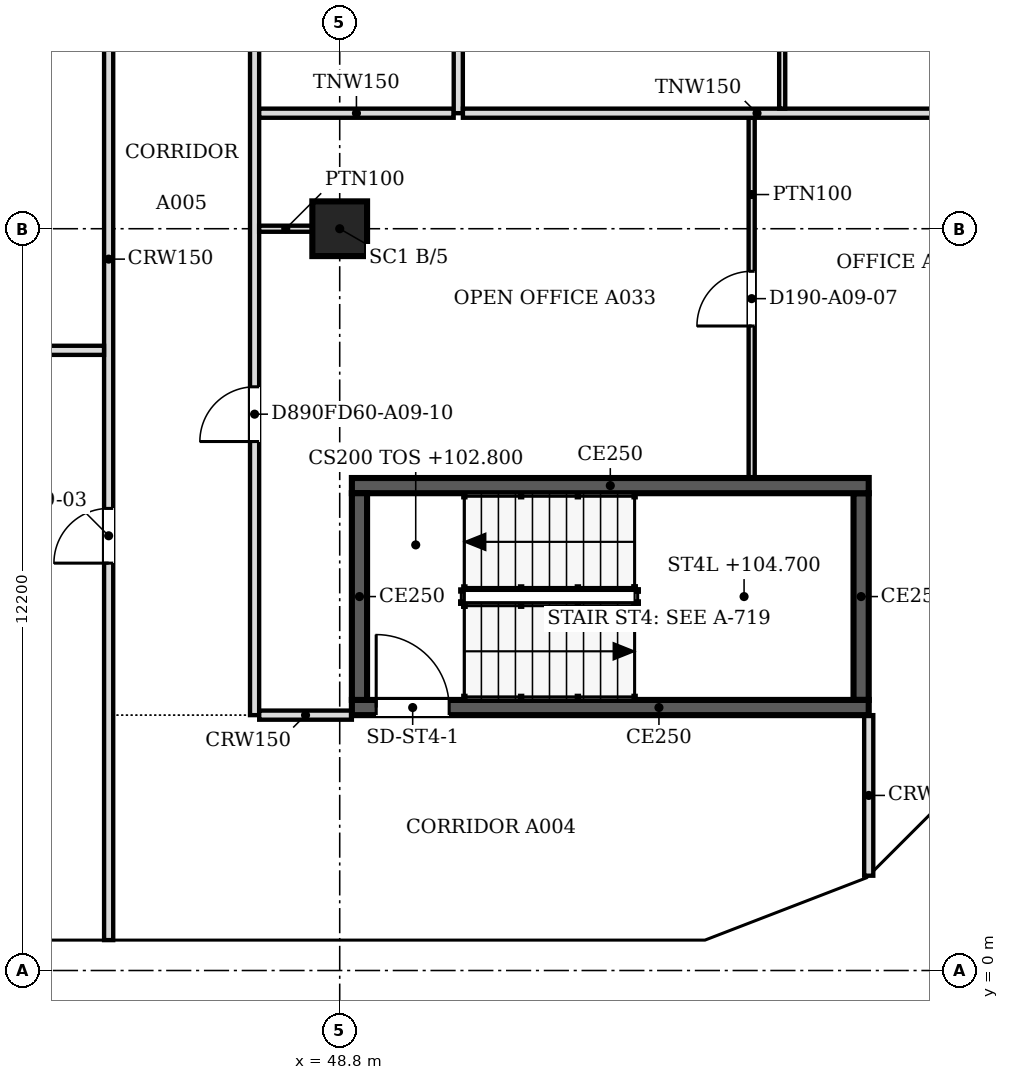
"""IFC4 building model, lengths in metres.
Left out: names, types, materials, properties, quantities, classifications, styles, units other than length and angle.
Written with IfcOpenShell. Run it as: python <this file> out.ifc"""

import sys

from ifc_helpers import new_model, si_unit, direction, frame, frame_2d, origin, origin_2d, place, context, subcontext, project, spatial, polyline, rectangle, outline, extrude, faceted_brep, source, transform, mapped, element, fill, save


model = new_model("IFC4")
c1 = context("Model", 3, precision=1e-05, world=origin(), true_north=direction((0.0, 1.0)))
c2 = subcontext(c1, "Body", "Model", "MODEL_VIEW")
j1 = project(units=[si_unit("LENGTHUNIT", "METRE"), si_unit("PLANEANGLEUNIT", "RADIAN")], contexts=[c1])
p1 = place(None, origin())
s1 = spatial("IfcSite", under=j1, at=p1, CompositionType="ELEMENT")
p2 = place(p1, origin())
s2 = spatial("IfcBuilding", under=s1, at=p2, CompositionType="ELEMENT")
p3 = place(p2, frame((0.0, 0.0, 102.8)))
s3 = spatial("IfcBuildingStorey", under=s2, at=p3, CompositionType="ELEMENT", Elevation=102.8)
p4 = place(p3, frame((48.8, 12.2, 0.0), z_axis=(0.0, 0.0, 1.0), x_axis=(1.0, 0.0, 0.0)))
e1 = element("IfcColumn", 1, at=p4, inside=s3, PredefinedType="COLUMN", context=c2, shape_type="SweptSolid", body=[
    extrude(rectangle(XDim=0.9, YDim=0.9, at=origin_2d()), origin(), (0.0, 0.0, 1.0), 3.55),
])
m1 = source(origin(), c2, "Body", "SweptSolid", [
    extrude(outline(polyline([(3.05, 0.0), (6.1, 3.8), (3.05, 7.6), (0.0, 3.8), (3.05, 0.0)])), frame((0.0, 0.25, 0.0), z_axis=(0.0, -1.0, 0.0), x_axis=(1.0, 0.0, 0.0)), (0.0, 0.0, 1.0), 0.5),
])
p5 = place(p3, frame((42.7, 0.25, -3.8), z_axis=(0.0, 0.0, 1.0), x_axis=(1.0, 0.0, 0.0)))
e2 = element("IfcWall", 2, at=p5, inside=s3, PredefinedType="SOLIDWALL", context=c2, shape_type="MappedRepresentation", body=[
    mapped(m1, transform((0.0, 0.0, 0.0), scale=1.0)),
])
m2 = source(origin(), c2, "Body", "SweptSolid", [
    extrude(outline(polyline([(3.05, 0.399), (5.78, 3.8), (3.05, 7.201), (0.321, 3.8), (3.05, 0.399)])), frame((0.0, 0.26, 0.0), z_axis=(0.0, -1.0, 0.0), x_axis=(1.0, 0.0, 0.0)), (0.0, 0.0, 1.0), 0.52),
])
p6 = place(p5, origin())
e3 = element("IfcOpeningElement", 3, at=p6, cuts=e2, PredefinedType="OPENING", context=c2, shape_type="MappedRepresentation", body=[
    mapped(m2, transform((0.0, 0.0, 0.0), scale=1.0)),
])
m3 = source(origin(), c2, "Body", "Brep", [
    faceted_brep([(3.05, -0.25, 0.0), (6.053, -0.25, 3.8), (3.05, -0.25, 7.6), (0.0, -0.25, 3.8), (0.0, 0.25, 3.8), (3.05, 0.25, 7.6), (6.007, 0.25, 3.859), (6.007, 0.25, 3.741), (3.05, 0.25, 0.0), (6.053, 0.0, 3.8)], [[[0, 1, 2, 3]], [[4, 5, 6, 7, 8]], [[8, 7, 9, 1, 0]], [[6, 5, 2, 1, 9]], [[5, 4, 3, 2]], [[4, 8, 0, 3]], [[9, 7, 6]]]),
])
p7 = place(p3, frame((48.8, 0.25, -3.8), z_axis=(0.0, 0.0, 1.0), x_axis=(1.0, 0.0, 0.0)))
e4 = element("IfcWall", 4, at=p7, inside=s3, PredefinedType="SOLIDWALL", context=c2, shape_type="MappedRepresentation", body=[
    mapped(m3, transform((0.0, 0.0, 0.0), scale=1.0)),
])
m4 = source(origin(), c2, "Body", "SweptSolid", [
    extrude(outline(polyline([(3.049, 0.401), (5.735, 3.8), (3.049, 7.199), (0.321, 3.8), (3.049, 0.401)])), frame((0.0, 0.26, 0.0), z_axis=(0.0, -1.0, 0.0), x_axis=(1.0, 0.0, 0.0)), (0.0, 0.0, 1.0), 0.52),
])
p8 = place(p7, origin())
e5 = element("IfcOpeningElement", 5, at=p8, cuts=e4, PredefinedType="OPENING", context=c2, shape_type="MappedRepresentation", body=[
    mapped(m4, transform((0.0, 0.0, 0.0), scale=1.0)),
])
m5 = source(origin(), c2, "Body", "Brep", [
    faceted_brep([(2.95, -0.25, 0.0), (3.003, -0.25, 0.068), (3.003, -0.25, 7.532), (2.95, -0.25, 7.6), (0.0, -0.25, 3.8), (0.047, 0.25, 3.86), (2.898, 0.25, 7.532), (2.898, 0.25, 0.068), (0.047, 0.25, 3.74), (2.95, 0.0, 0.0), (2.95, 0.0, 7.6), (0.0, 0.0, 3.8)], [[[0, 1, 2, 3, 4]], [[5, 6, 7, 8]], [[1, 0, 9]], [[10, 3, 2]], [[6, 5, 11, 4, 3, 10]], [[8, 7, 9, 0, 4, 11]], [[8, 11, 5]], [[1, 9, 7, 6, 10, 2]]]),
])
p9 = place(p3, frame((54.854, 0.25, -3.8), z_axis=(0.0, 0.0, 1.0), x_axis=(0.932970071518, 0.359953949349, 0.0)))
e6 = element("IfcWall", 6, at=p9, inside=s3, PredefinedType="SOLIDWALL", context=c2, shape_type="MappedRepresentation", body=[
    mapped(m5, transform((0.0, 0.0, 0.0), scale=1.0)),
])
m6 = source(origin(), c2, "Body", "SweptSolid", [
    extrude(outline(polyline([(2.75, 6.935), (0.316, 3.8), (2.75, 0.665), (2.75, 6.935)])), frame((0.0, 0.26, 0.0), z_axis=(0.0, -1.0, 0.0), x_axis=(1.0, 0.0, 0.0)), (0.0, 0.0, 1.0), 0.52),
])
p10 = place(p9, origin())
e7 = element("IfcOpeningElement", 7, at=p10, cuts=e6, PredefinedType="OPENING", context=c2, shape_type="MappedRepresentation", body=[
    mapped(m6, transform((0.0, 0.0, 0.0), scale=1.0)),
])
m7 = source(origin(), c2, "Body", "Brep", [
    faceted_brep([(0.053, -0.25, 0.0), (2.997, -0.25, 3.8), (0.053, -0.25, 7.6), (0.0, -0.25, 7.532), (0.0, -0.25, 0.068), (0.106, 0.25, 7.532), (2.944, 0.25, 3.868), (2.944, 0.25, 3.732), (0.106, 0.25, 0.068), (2.997, 0.0, 3.8), (0.053, 0.0, 0.0), (0.053, 0.0, 7.6)], [[[0, 1, 2, 3, 4]], [[5, 6, 7, 8]], [[8, 7, 9, 1, 0, 10]], [[6, 5, 11, 2, 1, 9]], [[3, 2, 11]], [[10, 0, 4]], [[8, 10, 4, 3, 11, 5]], [[9, 7, 6]]]),
])
p11 = place(p3, frame((57.569, 1.274, -3.8), z_axis=(0.0, 0.0, 1.0), x_axis=(0.707066050402, 0.707147509625, 0.0)))
e8 = element("IfcWall", 8, at=p11, inside=s3, PredefinedType="SOLIDWALL", context=c2, shape_type="MappedRepresentation", body=[
    mapped(m7, transform((0.0, 0.0, 0.0), scale=1.0)),
])
m8 = source(origin(), c2, "Body", "SweptSolid", [
    extrude(outline(polyline([(0.253, 0.666), (2.681, 3.8), (0.253, 6.934), (0.253, 0.666)])), frame((0.0, 0.26, 0.0), z_axis=(0.0, -1.0, 0.0), x_axis=(1.0, 0.0, 0.0)), (0.0, 0.0, 1.0), 0.52),
])
p12 = place(p11, origin())
e9 = element("IfcOpeningElement", 9, at=p12, cuts=e8, PredefinedType="OPENING", context=c2, shape_type="MappedRepresentation", body=[
    mapped(m8, transform((0.0, 0.0, 0.0), scale=1.0)),
])
m9 = source(origin(), c2, "Body", "SweptSolid", [
    extrude(outline(polyline([(3.05, 0.0), (6.1, 3.8), (0.0, 3.8), (3.05, 0.0)])), frame((0.0, 0.25, 0.0), z_axis=(0.0, -1.0, 0.0), x_axis=(1.0, 0.0, 0.0)), (0.0, 0.0, 1.0), 0.5),
])
p13 = place(p3, frame((39.65, 0.25, 0.0), z_axis=(0.0, 0.0, 1.0), x_axis=(1.0, 0.0, 0.0)))
e10 = element("IfcWall", 10, at=p13, inside=s3, PredefinedType="SOLIDWALL", context=c2, shape_type="MappedRepresentation", body=[
    mapped(m9, transform((0.0, 0.0, 0.0), scale=1.0)),
])
m10 = source(origin(), c2, "Body", "SweptSolid", [
    extrude(outline(polyline([(3.05, 0.399), (5.579, 3.55), (0.521, 3.55), (3.05, 0.399)])), frame((0.0, 0.26, 0.0), z_axis=(0.0, -1.0, 0.0), x_axis=(1.0, 0.0, 0.0)), (0.0, 0.0, 1.0), 0.52),
])
p14 = place(p13, origin())
e11 = element("IfcOpeningElement", 11, at=p14, cuts=e10, PredefinedType="OPENING", context=c2, shape_type="MappedRepresentation", body=[
    mapped(m10, transform((0.0, 0.0, 0.0), scale=1.0)),
])
p15 = place(p3, frame((45.75, 0.25, 0.0), z_axis=(0.0, 0.0, 1.0), x_axis=(1.0, 0.0, 0.0)))
e12 = element("IfcWall", 12, at=p15, inside=s3, PredefinedType="SOLIDWALL", context=c2, shape_type="MappedRepresentation", body=[
    mapped(m9, transform((0.0, 0.0, 0.0), scale=1.0)),
])
p16 = place(p15, origin())
e13 = element("IfcOpeningElement", 13, at=p16, cuts=e12, PredefinedType="OPENING", context=c2, shape_type="MappedRepresentation", body=[
    mapped(m10, transform((0.0, 0.0, 0.0), scale=1.0)),
])
m11 = source(origin(), c2, "Body", "Brep", [
    faceted_brep([(3.003, -0.25, 0.0), (3.05, -0.25, 0.06), (3.05, -0.25, 3.8), (0.0, -0.25, 3.8), (0.0, 0.25, 3.8), (2.957, 0.25, 3.8), (2.957, 0.25, 0.059), (3.003, 0.0, 0.0)], [[[0, 1, 2, 3]], [[4, 5, 6]], [[1, 0, 7]], [[5, 4, 3, 2]], [[4, 6, 7, 0, 3]], [[1, 7, 6, 5, 2]]]),
])
p17 = place(p3, frame((51.85, 0.25, 0.0), z_axis=(0.0, 0.0, 1.0), x_axis=(1.0, 0.0, 0.0)))
e14 = element("IfcWall", 14, at=p17, inside=s3, PredefinedType="SOLIDWALL", context=c2, shape_type="MappedRepresentation", body=[
    mapped(m11, transform((0.0, 0.0, 0.0), scale=1.0)),
])
m12 = source(origin(), c2, "Body", "SweptSolid", [
    extrude(outline(polyline([(2.803, 3.55), (0.516, 3.55), (2.803, 0.656), (2.803, 3.55)])), frame((0.0, 0.26, 0.0), z_axis=(0.0, -1.0, 0.0), x_axis=(1.0, 0.0, 0.0)), (0.0, 0.0, 1.0), 0.52),
])
p18 = place(p17, origin())
e15 = element("IfcOpeningElement", 15, at=p18, cuts=e14, PredefinedType="OPENING", context=c2, shape_type="MappedRepresentation", body=[
    mapped(m12, transform((0.0, 0.0, 0.0), scale=1.0)),
])
m13 = source(origin(), c2, "Body", "Brep", [
    faceted_brep([(0.047, -0.25, 0.0), (2.997, -0.25, 3.8), (0.0, -0.25, 3.8), (0.0, -0.25, 0.059), (0.093, 0.25, 3.8), (2.944, 0.25, 3.8), (2.944, 0.25, 3.732), (0.093, 0.25, 0.06), (2.997, 0.0, 3.8), (0.047, 0.0, 0.0)], [[[0, 1, 2, 3]], [[4, 5, 6, 7]], [[7, 6, 8, 1, 0, 9]], [[5, 4, 2, 1, 8]], [[9, 0, 3]], [[7, 9, 3, 2, 4]], [[6, 5, 8]]]),
])
p19 = place(p3, frame((54.81, 0.233, 0.0), z_axis=(0.0, 0.0, 1.0), x_axis=(0.932990326376, 0.359901446078, 0.0)))
e16 = element("IfcWall", 16, at=p19, inside=s3, PredefinedType="SOLIDWALL", context=c2, shape_type="MappedRepresentation", body=[
    mapped(m13, transform((0.0, 0.0, 0.0), scale=1.0)),
])
m14 = source(origin(), c2, "Body", "SweptSolid", [
    extrude(outline(polyline([(0.247, 0.665), (2.487, 3.55), (0.247, 3.55), (0.247, 0.665)])), frame((0.0, 0.26, 0.0), z_axis=(0.0, -1.0, 0.0), x_axis=(1.0, 0.0, 0.0)), (0.0, 0.0, 1.0), 0.52),
])
p20 = place(p19, origin())
e17 = element("IfcOpeningElement", 17, at=p20, cuts=e16, PredefinedType="OPENING", context=c2, shape_type="MappedRepresentation", body=[
    mapped(m14, transform((0.0, 0.0, 0.0), scale=1.0)),
])
m15 = source(origin(), c2, "Body", "Brep", [
    faceted_brep([(2.944, -0.25, 0.0), (2.997, -0.25, 0.068), (2.997, -0.25, 3.8), (0.0, -0.25, 3.8), (0.053, 0.25, 3.8), (2.891, 0.25, 3.8), (2.891, 0.25, 0.068), (0.053, 0.25, 3.732), (2.944, 0.0, 0.0), (0.0, 0.0, 3.8)], [[[0, 1, 2, 3]], [[4, 5, 6, 7]], [[1, 0, 8]], [[5, 4, 9, 3, 2]], [[7, 6, 8, 0, 3, 9]], [[7, 9, 4]], [[1, 8, 6, 5, 2]]]),
])
p21 = place(p3, frame((57.606, 1.312, 0.0), z_axis=(0.0, 0.0, 1.0), x_axis=(0.707147509625, 0.707066050402, 0.0)))
e18 = element("IfcWall", 18, at=p21, inside=s3, PredefinedType="SOLIDWALL", context=c2, shape_type="MappedRepresentation", body=[
    mapped(m15, transform((0.0, 0.0, 0.0), scale=1.0)),
])
m16 = source(origin(), c2, "Body", "SweptSolid", [
    extrude(outline(polyline([(2.744, 3.55), (0.51, 3.55), (2.744, 0.666), (2.744, 3.55)])), frame((0.0, 0.26, 0.0), z_axis=(0.0, -1.0, 0.0), x_axis=(1.0, 0.0, 0.0)), (0.0, 0.0, 1.0), 0.52),
])
p22 = place(p21, origin())
e19 = element("IfcOpeningElement", 19, at=p22, cuts=e18, PredefinedType="OPENING", context=c2, shape_type="MappedRepresentation", body=[
    mapped(m16, transform((0.0, 0.0, 0.0), scale=1.0)),
])
p23 = place(p3, frame((57.5, 4.325, 0.0), z_axis=(0.0, 0.0, 1.0), x_axis=(-1.0, 0.0, 0.0)))
e20 = element("IfcWall", 20, at=p23, inside=s3, PredefinedType="SOLIDWALL", context=c2, shape_type="SweptSolid", body=[
    extrude(rectangle(XDim=8.5, YDim=0.25, at=frame_2d((4.25, 0.0))), origin(), (0.0, 0.0, 1.0), 3.8),
])
m17 = source(origin(), c2, "Body", "SweptSolid", [
    extrude(rectangle(XDim=1.2, YDim=2.1, at=frame_2d((0.6, 1.05))), frame((0.0, 0.135, 0.0), z_axis=(0.0, -1.0, 0.0), x_axis=(1.0, 0.0, 0.0)), (0.0, 0.0, 1.0), 0.27),
])
p24 = place(p23, frame((6.9, 0.0, 0.0)))
e21 = element("IfcOpeningElement", 21, at=p24, cuts=e20, PredefinedType="OPENING", context=c2, shape_type="MappedRepresentation", body=[
    mapped(m17, transform((0.0, 0.0, 0.0), scale=1.0)),
])
p25 = place(p3, frame((49.125, 4.45, 0.0), z_axis=(0.0, 0.0, 1.0), x_axis=(0.0, 1.0, 0.0)))
e22 = element("IfcWall", 22, at=p25, inside=s3, PredefinedType="SOLIDWALL", context=c2, shape_type="SweptSolid", body=[
    extrude(rectangle(XDim=3.4, YDim=0.25, at=frame_2d((1.7, 0.0))), origin(), (0.0, 0.0, 1.0), 3.8),
])
p26 = place(p3, frame((49.0, 7.975, 0.0), z_axis=(0.0, 0.0, 1.0), x_axis=(1.0, 0.0, 0.0)))
e23 = element("IfcWall", 23, at=p26, inside=s3, PredefinedType="SOLIDWALL", context=c2, shape_type="SweptSolid", body=[
    extrude(rectangle(XDim=8.5, YDim=0.25, at=frame_2d((4.25, 0.0))), origin(), (0.0, 0.0, 1.0), 3.8),
])
p27 = place(p3, frame((57.375, 7.85, 0.0), z_axis=(0.0, 0.0, 1.0), x_axis=(0.0, -1.0, 0.0)))
e24 = element("IfcWall", 24, at=p27, inside=s3, PredefinedType="SOLIDWALL", context=c2, shape_type="SweptSolid", body=[
    extrude(rectangle(XDim=3.4, YDim=0.25, at=frame_2d((1.7, 0.0))), origin(), (0.0, 0.0, 1.0), 3.8),
])
p28 = place(p3, frame((45.0, 0.5, 0.0), z_axis=(0.0, 0.0, 1.0), x_axis=(0.0, 1.0, 0.0)))
e25 = element("IfcWall", 25, at=p28, inside=s3, PredefinedType="PARTITIONING", context=c2, shape_type="SweptSolid", body=[
    extrude(rectangle(XDim=21.724, YDim=0.15, at=frame_2d((10.862, 0.0))), origin(), (0.0, 0.0, 1.0), 2.715),
])
m18 = source(origin(), c2, "Body", "SweptSolid", [
    extrude(rectangle(XDim=0.9, YDim=2.1, at=frame_2d((0.45, 1.05))), frame((0.0, 0.085, 0.0), z_axis=(0.0, -1.0, 0.0), x_axis=(1.0, 0.0, 0.0)), (0.0, 0.0, 1.0), 0.17),
])
p29 = place(p28, frame((6.2, 0.0, 0.0)))
e26 = element("IfcOpeningElement", 26, at=p29, cuts=e25, PredefinedType="OPENING", context=c2, shape_type="MappedRepresentation", body=[
    mapped(m18, transform((0.0, 0.0, 0.0), scale=1.0)),
])
p30 = place(p28, frame((15.3, 0.0, 0.0)))
e27 = element("IfcOpeningElement", 27, at=p30, cuts=e25, PredefinedType="OPENING", context=c2, shape_type="MappedRepresentation", body=[
    mapped(m18, transform((0.0, 0.0, 0.0), scale=1.0)),
])
p31 = place(p3, frame((57.5, 1.559, 0.0), z_axis=(0.0, 0.0, 1.0), x_axis=(0.0, 1.0, 0.0)))
e28 = element("IfcWall", 28, at=p31, inside=s3, PredefinedType="PARTITIONING", context=c2, shape_type="SweptSolid", body=[
    extrude(rectangle(XDim=2.641, YDim=0.15, at=frame_2d((1.32, 0.0))), origin(), (0.0, 0.0, 1.0), 2.715),
])
p32 = place(p3, frame((47.4, 22.3, 0.0), z_axis=(0.0, 0.0, 1.0), x_axis=(0.0, -1.0, 0.0)))
e29 = element("IfcWall", 29, at=p32, inside=s3, PredefinedType="PARTITIONING", context=c2, shape_type="SweptSolid", body=[
    extrude(rectangle(XDim=18.1, YDim=0.15, at=frame_2d((9.05, 0.0))), origin(), (0.0, 0.0, 1.0), 2.715),
])
m19 = source(origin(), c2, "Body", "SweptSolid", [
    extrude(rectangle(XDim=1.0, YDim=2.1, at=frame_2d((0.5, 1.05))), frame((0.0, 0.085, 0.0), z_axis=(0.0, -1.0, 0.0), x_axis=(1.0, 0.0, 0.0)), (0.0, 0.0, 1.0), 0.17),
])
p33 = place(p32, frame((3.599, 0.0, 0.0)))
e30 = element("IfcOpeningElement", 30, at=p33, cuts=e29, PredefinedType="OPENING", context=c2, shape_type="MappedRepresentation", body=[
    mapped(m19, transform((0.0, 0.0, 0.0), scale=1.0)),
])
p34 = place(p32, frame((12.7, 0.0, 0.0)))
e31 = element("IfcOpeningElement", 31, at=p34, cuts=e29, PredefinedType="OPENING", context=c2, shape_type="MappedRepresentation", body=[
    mapped(m18, transform((0.0, 0.0, 0.0), scale=1.0)),
])
p35 = place(p3, frame((47.476, 4.2, 0.0), z_axis=(0.0, 0.0, 1.0), x_axis=(1.0, 0.0, 0.0)))
e32 = element("IfcWall", 32, at=p35, inside=s3, PredefinedType="PARTITIONING", context=c2, shape_type="SweptSolid", body=[
    extrude(rectangle(XDim=1.524, YDim=0.15, at=frame_2d((0.762, 0.0))), origin(), (0.0, 0.0, 1.0), 2.715),
])
p36 = place(p3, frame((55.575, 14.024, 0.0), z_axis=(0.0, 0.0, 1.0), x_axis=(0.0, -1.0, 0.0)))
e33 = element("IfcWall", 33, at=p36, inside=s3, PredefinedType="PARTITIONING", context=c2, shape_type="SweptSolid", body=[
    extrude(rectangle(XDim=5.924, YDim=0.1, at=frame_2d((2.962, 0.0))), origin(), (0.0, 0.0, 1.0), 2.715),
])
m20 = source(origin(), c2, "Body", "SweptSolid", [
    extrude(rectangle(XDim=0.9, YDim=2.1, at=frame_2d((0.45, 1.05))), frame((0.0, 0.06, 0.0), z_axis=(0.0, -1.0, 0.0), x_axis=(1.0, 0.0, 0.0)), (0.0, 0.0, 1.0), 0.12),
])
p37 = place(p36, frame((2.524, 0.0, 0.0)))
e34 = element("IfcOpeningElement", 34, at=p37, cuts=e33, PredefinedType="OPENING", context=c2, shape_type="MappedRepresentation", body=[
    mapped(m20, transform((0.0, 0.0, 0.0), scale=1.0)),
])
p38 = place(p3, frame((27.575, 10.2, 0.0), z_axis=(0.0, 0.0, 1.0), x_axis=(1.0, 0.0, 0.0)))
e35 = element("IfcWall", 35, at=p38, inside=s3, PredefinedType="PARTITIONING", context=c2, shape_type="SweptSolid", body=[
    extrude(rectangle(XDim=17.349, YDim=0.15, at=frame_2d((8.675, 0.0))), origin(), (0.0, 0.0, 1.0), 2.715),
])
p39 = place(p3, frame((48.35, 12.2, 0.0), z_axis=(0.0, 0.0, 1.0), x_axis=(-1.0, 0.0, 0.0)))
e36 = element("IfcWall", 36, at=p39, inside=s3, PredefinedType="PARTITIONING", context=c2, shape_type="SweptSolid", body=[
    extrude(rectangle(XDim=0.875, YDim=0.1, at=frame_2d((0.438, 0.0))), origin(), (0.0, 0.0, 1.0), 2.715),
])
p40 = place(p3, frame((47.476, 14.1, 0.0), z_axis=(0.0, 0.0, 1.0), x_axis=(1.0, 0.0, 0.0)))
e37 = element("IfcWall", 37, at=p40, inside=s3, PredefinedType="PARTITIONING", context=c2, shape_type="SweptSolid", body=[
    extrude(rectangle(XDim=3.198, YDim=0.15, at=frame_2d((1.599, 0.0))), origin(), (0.0, 0.0, 1.0), 2.715),
])
p41 = place(p3, frame((50.75, 22.224, 0.0), z_axis=(0.0, 0.0, 1.0), x_axis=(0.0, -1.0, 0.0)))
e38 = element("IfcWall", 38, at=p41, inside=s3, PredefinedType="PARTITIONING", context=c2, shape_type="SweptSolid", body=[
    extrude(rectangle(XDim=8.124, YDim=0.15, at=frame_2d((4.062, 0.0))), origin(), (0.0, 0.0, 1.0), 2.715),
])
p42 = place(p41, frame((3.624, 0.0, 0.0)))
e39 = element("IfcOpeningElement", 39, at=p42, cuts=e38, PredefinedType="OPENING", context=c2, shape_type="MappedRepresentation", body=[
    mapped(m18, transform((0.0, 0.0, 0.0), scale=1.0)),
])
p43 = place(p3, frame((50.826, 14.1, 0.0), z_axis=(0.0, 0.0, 1.0), x_axis=(1.0, 0.0, 0.0)))
e40 = element("IfcWall", 40, at=p43, inside=s3, PredefinedType="PARTITIONING", context=c2, shape_type="SweptSolid", body=[
    extrude(rectangle(XDim=9.674, YDim=0.15, at=frame_2d((4.837, 0.0))), origin(), (0.0, 0.0, 1.0), 2.715),
])
p44 = place(p3, frame((56.077, 22.224, 0.0), z_axis=(0.0, 0.0, 1.0), x_axis=(0.0, -1.0, 0.0)))
e41 = element("IfcWall", 41, at=p44, inside=s3, PredefinedType="PARTITIONING", context=c2, shape_type="SweptSolid", body=[
    extrude(rectangle(XDim=8.048, YDim=0.1, at=frame_2d((4.024, 0.0))), origin(), (0.0, 0.0, 1.0), 2.715),
])
p45 = place(p44, frame((3.548, 0.0, 0.0)))
e42 = element("IfcOpeningElement", 42, at=p45, cuts=e41, PredefinedType="OPENING", context=c2, shape_type="MappedRepresentation", body=[
    mapped(m20, transform((0.0, 0.0, 0.0), scale=1.0)),
])
m21 = source(origin(), c2, "Body", "SweptSolid", [
    extrude(rectangle(XDim=1.2, YDim=2.1, at=frame_2d((0.6, 1.05))), frame((0.0, 0.025, 0.0), z_axis=(0.0, -1.0, 0.0), x_axis=(1.0, 0.0, 0.0)), (0.0, 0.0, 1.0), 0.05),
])
p46 = place(p24, origin())
e43 = element("IfcDoor", 43, at=p46, inside=s3, OperationType="SINGLE_SWING_RIGHT", PredefinedType="DOOR", context=c2, shape_type="MappedRepresentation", body=[
    mapped(m21, transform((0.0, 0.0, 0.0), scale=1.0)),
])
fill(e21, e43)
m22 = source(origin(), c2, "Body", "SweptSolid", [
    extrude(rectangle(XDim=0.9, YDim=2.1, at=frame_2d((0.45, 1.05))), frame((0.0, 0.025, 0.0), z_axis=(0.0, -1.0, 0.0), x_axis=(1.0, 0.0, 0.0)), (0.0, 0.0, 1.0), 0.05),
])
p47 = place(p37, origin())
e44 = element("IfcDoor", 44, at=p47, inside=s3, OperationType="SINGLE_SWING_RIGHT", PredefinedType="DOOR", context=c2, shape_type="MappedRepresentation", body=[
    mapped(m22, transform((0.0, 0.0, 0.0), scale=1.0)),
])
fill(e34, e44)
p48 = place(p29, origin())
e45 = element("IfcDoor", 45, at=p48, inside=s3, OperationType="SINGLE_SWING_LEFT", PredefinedType="DOOR", context=c2, shape_type="MappedRepresentation", body=[
    mapped(m22, transform((0.0, 0.0, 0.0), scale=1.0)),
])
fill(e26, e45)
p49 = place(p34, origin())
e46 = element("IfcDoor", 46, at=p49, inside=s3, OperationType="SINGLE_SWING_RIGHT", PredefinedType="DOOR", context=c2, shape_type="MappedRepresentation", body=[
    mapped(m22, transform((0.0, 0.0, 0.0), scale=1.0)),
])
fill(e31, e46)
save(model, sys.argv[1])
